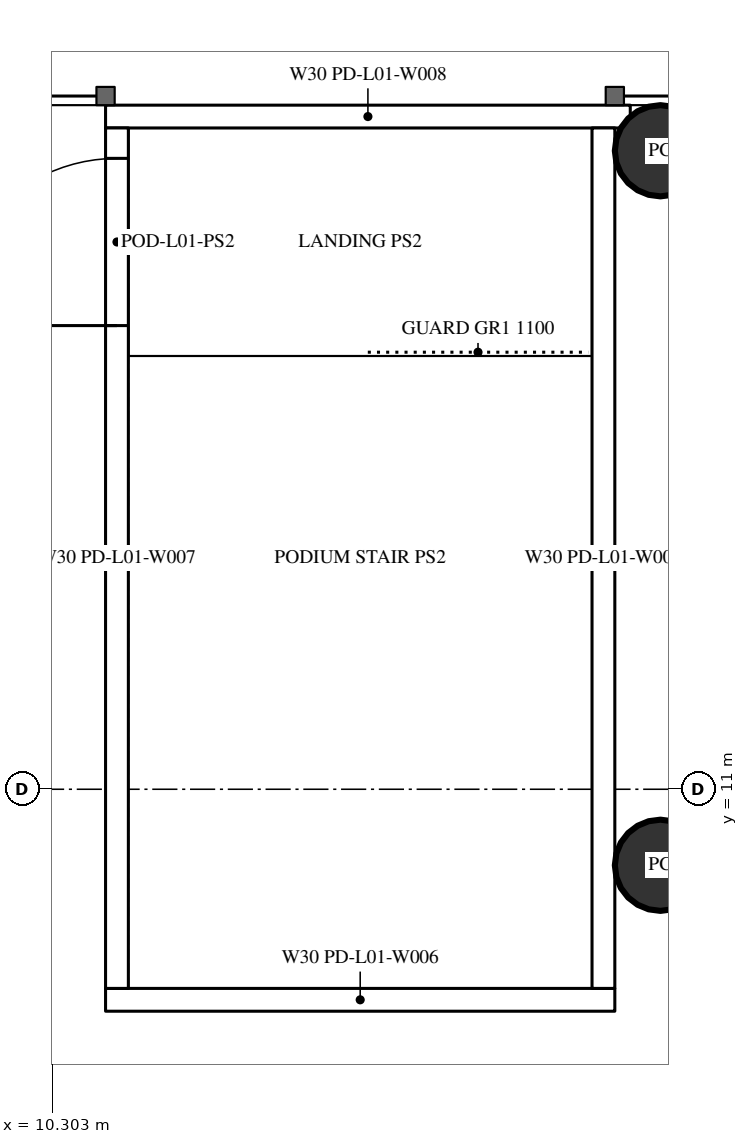
"""IFC4 building model, lengths in metres.
Left out: names, types, materials, properties, quantities, classifications, styles, units other than length and angle.
Written with IfcOpenShell. Run it as: python <this file> out.ifc"""

import sys

from ifc_helpers import new_model, si_unit, direction, frame, frame_2d, origin, origin_2d, place, context, subcontext, project, spatial, rectangle, circle, extrude, element, fill, save


model = new_model("IFC4")
c1 = context("Model", 3, precision=1e-05, world=origin(), true_north=direction((0.0, 1.0)))
c2 = subcontext(c1, "Body", "Model", "MODEL_VIEW")
j1 = project(units=[si_unit("LENGTHUNIT", "METRE"), si_unit("PLANEANGLEUNIT", "RADIAN")], contexts=[c1])
p1 = place(None, origin())
s1 = spatial("IfcSite", under=j1, at=p1, CompositionType="ELEMENT")
p2 = place(p1, origin())
s2 = spatial("IfcBuilding", under=s1, at=p2, CompositionType="ELEMENT")
p3 = place(p2, frame((0.0, 0.0, 7.2)))
s3 = spatial("IfcBuildingStorey", under=s2, at=p3, CompositionType="ELEMENT", Elevation=7.2)
for number, where, z_axis, x_axis in (
    (1, (18.3, 10.0, 0.0), (0.0, 0.0, 1.0), (1.0, 0.0, 0.0)),
    (2, (18.3, 19.4, 0.0), (0.0, 0.0, 1.0), (1.0, 0.0, 0.0)),
):
    element("IfcColumn", number, at=place(p3, frame(where, z_axis=z_axis, x_axis=x_axis)), inside=s3, PredefinedType="COLUMN", context=c2, shape_type="SweptSolid", body=[
        extrude(circle(Radius=0.6, at=origin_2d()), origin(), (0.0, 0.0, 1.0), 5.4),
    ])
p4 = place(p3, frame((11.0, 19.85, 0.0), z_axis=(0.0, 0.0, 1.0), x_axis=(1.0, 0.0, 0.0)))
e3 = element("IfcWall", 3, at=p4, inside=s3, PredefinedType="SOLIDWALL", context=c2, shape_type="SweptSolid", body=[
    extrude(rectangle(XDim=6.903, YDim=0.3, at=frame_2d((3.452, 0.0))), origin(), (0.0, 0.0, 1.0), 5.05),
])
p5 = place(p3, frame((11.0, 8.23, 0.0), z_axis=(0.0, 0.0, 1.0), x_axis=(1.0, 0.0, 0.0)))
e4 = element("IfcWall", 4, at=p5, inside=s3, PredefinedType="SOLIDWALL", context=c2, shape_type="SweptSolid", body=[
    extrude(rectangle(XDim=6.7, YDim=0.3, at=frame_2d((3.35, 0.0))), origin(), (0.0, 0.0, 1.0), 5.05),
])
p6 = place(p3, frame((11.15, 8.38, 0.0), z_axis=(0.0, 0.0, 1.0), x_axis=(0.0, 1.0, 0.0)))
e5 = element("IfcWall", 5, at=p6, inside=s3, PredefinedType="SOLIDWALL", context=c2, shape_type="SweptSolid", body=[
    extrude(rectangle(XDim=11.32, YDim=0.3, at=frame_2d((5.66, 0.0))), origin(), (0.0, 0.0, 1.0), 5.05),
])
p7 = place(p6, frame((8.72, 0.0, 0.0)))
e6 = element("IfcOpeningElement", 6, at=p7, cuts=e5, PredefinedType="OPENING", context=c2, shape_type="SweptSolid", body=[
    extrude(rectangle(XDim=2.2, YDim=2.2, at=frame_2d((1.1, 1.1))), frame((0.0, 0.16, 0.0), z_axis=(0.0, -1.0, 0.0), x_axis=(1.0, 0.0, 0.0)), (0.0, 0.0, 1.0), 0.32),
])
p8 = place(p3, frame((17.55, 8.38, 0.0), z_axis=(0.0, 0.0, 1.0), x_axis=(0.0, 1.0, 0.0)))
e7 = element("IfcWall", 7, at=p8, inside=s3, PredefinedType="SOLIDWALL", context=c2, shape_type="SweptSolid", body=[
    extrude(rectangle(XDim=11.32, YDim=0.3, at=frame_2d((5.66, 0.0))), origin(), (0.0, 0.0, 1.0), 5.05),
])
p9 = place(p7, origin())
e8 = element("IfcDoor", 8, at=p9, inside=s3, OperationType="DOUBLE_DOOR_SINGLE_SWING", PredefinedType="DOOR", context=c2, shape_type="SweptSolid", body=[
    extrude(rectangle(XDim=2.2, YDim=2.2, at=frame_2d((1.1, 1.1))), frame((0.0, 0.025, 0.0), z_axis=(0.0, -1.0, 0.0), x_axis=(1.0, 0.0, 0.0)), (0.0, 0.0, 1.0), 0.05),
])
fill(e6, e8)
save(model, sys.argv[1])
